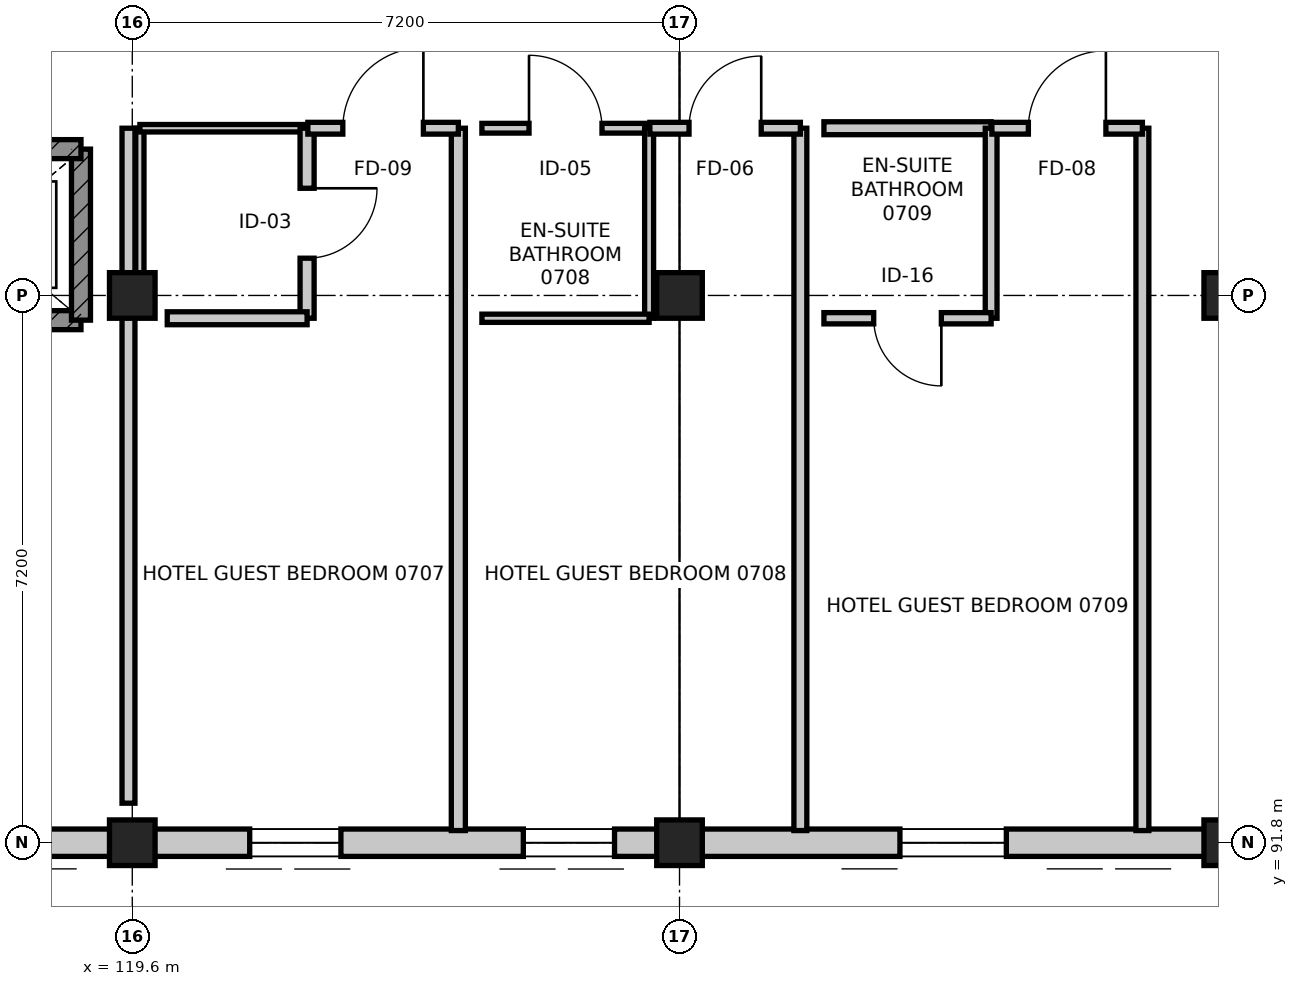
"""IFC4 building model, lengths in metres.
Left out: names, types, materials, properties, quantities, classifications, styles, units other than length and angle.
Written with IfcOpenShell. Run it as: python <this file> out.ifc"""

import sys

from ifc_helpers import new_model, si_unit, direction, frame, frame_2d, origin, origin_2d, place, context, subcontext, project, spatial, rectangle, extrude, element, fill, save


model = new_model("IFC4")
c1 = context("Model", 3, precision=1e-05, world=origin(), true_north=direction((0.0, 1.0)))
c2 = subcontext(c1, "Body", "Model", "MODEL_VIEW")
j1 = project(units=[si_unit("LENGTHUNIT", "METRE"), si_unit("PLANEANGLEUNIT", "RADIAN")], contexts=[c1])
p1 = place(None, origin())
s1 = spatial("IfcSite", under=j1, at=p1, CompositionType="ELEMENT")
p2 = place(p1, origin())
s2 = spatial("IfcBuilding", under=s1, at=p2, CompositionType="ELEMENT")
p3 = place(p2, frame((0.0, 0.0, 30.0)))
s3 = spatial("IfcBuildingStorey", under=s2, at=p3, CompositionType="ELEMENT", Elevation=30.0)
for number, where, z_axis, x_axis in (
    (1, (119.6, 91.8, 0.0), (0.0, 0.0, 1.0), (1.0, 0.0, 0.0)),
    (2, (119.6, 99.0, 0.0), (0.0, 0.0, 1.0), (1.0, 0.0, 0.0)),
    (3, (126.8, 91.8, 0.0), (0.0, 0.0, 1.0), (1.0, 0.0, 0.0)),
    (4, (126.8, 99.0, 0.0), (0.0, 0.0, 1.0), (1.0, 0.0, 0.0)),
    (5, (134.0, 91.8, 0.0), (0.0, 0.0, 1.0), (1.0, 0.0, 0.0)),
    (6, (134.0, 99.0, 0.0), (0.0, 0.0, 1.0), (1.0, 0.0, 0.0)),
):
    element("IfcColumn", number, at=place(p3, frame(where, z_axis=z_axis, x_axis=x_axis)), inside=s3, PredefinedType="COLUMN", context=c2, shape_type="SweptSolid", body=[
        extrude(rectangle(XDim=0.6, YDim=0.6, at=origin_2d()), origin(), (0.0, 0.0, 1.0), 3.6),
    ])
p4 = place(p3, frame((134.0, 91.8, 0.0), z_axis=(0.0, 0.0, 1.0), x_axis=(-1.0, 0.0, 0.0)))
e7 = element("IfcWall", 7, at=p4, inside=s3, PredefinedType="STANDARD", context=c2, shape_type="SweptSolid", body=[
    extrude(rectangle(XDim=7.2, YDim=0.36, at=frame_2d((3.6, 0.0))), origin(), (0.0, 0.0, 1.0), 2.745),
])
p5 = place(p4, frame((2.9, 0.0, 0.75)))
e8 = element("IfcOpeningElement", 8, at=p5, cuts=e7, PredefinedType="OPENING", context=c2, shape_type="SweptSolid", body=[
    extrude(rectangle(XDim=1.4, YDim=1.75, at=frame_2d((0.7, 0.875))), frame((0.0, 0.19, 0.0), z_axis=(0.0, -1.0, 0.0), x_axis=(1.0, 0.0, 0.0)), (0.0, 0.0, 1.0), 0.38),
])
p6 = place(p3, frame((126.8, 91.8, 0.0), z_axis=(0.0, 0.0, 1.0), x_axis=(-1.0, 0.0, 0.0)))
e9 = element("IfcWall", 9, at=p6, inside=s3, PredefinedType="STANDARD", context=c2, shape_type="SweptSolid", body=[
    extrude(rectangle(XDim=7.2, YDim=0.36, at=frame_2d((3.6, 0.0))), origin(), (0.0, 0.0, 1.0), 2.745),
])
p7 = place(p6, frame((0.855, 0.0, 0.75)))
e10 = element("IfcOpeningElement", 10, at=p7, cuts=e9, PredefinedType="OPENING", context=c2, shape_type="SweptSolid", body=[
    extrude(rectangle(XDim=1.2, YDim=1.75, at=frame_2d((0.6, 0.875))), frame((0.0, 0.19, 0.0), z_axis=(0.0, -1.0, 0.0), x_axis=(1.0, 0.0, 0.0)), (0.0, 0.0, 1.0), 0.38),
])
p8 = place(p6, frame((4.455, 0.0, 0.75)))
e11 = element("IfcOpeningElement", 11, at=p8, cuts=e9, PredefinedType="OPENING", context=c2, shape_type="SweptSolid", body=[
    extrude(rectangle(XDim=1.2, YDim=1.75, at=frame_2d((0.6, 0.875))), frame((0.0, 0.19, 0.0), z_axis=(0.0, -1.0, 0.0), x_axis=(1.0, 0.0, 0.0)), (0.0, 0.0, 1.0), 0.38),
])
p9 = place(p3, frame((119.6, 91.8, 0.0), z_axis=(0.0, 0.0, 1.0), x_axis=(-1.0, 0.0, 0.0)))
e12 = element("IfcWall", 12, at=p9, inside=s3, PredefinedType="STANDARD", context=c2, shape_type="SweptSolid", body=[
    extrude(rectangle(XDim=7.2, YDim=0.36, at=frame_2d((3.6, 0.0))), origin(), (0.0, 0.0, 1.0), 2.745),
])
p10 = place(p9, frame((1.488, 0.0, 0.75)))
e13 = element("IfcOpeningElement", 13, at=p10, cuts=e12, PredefinedType="OPENING", context=c2, shape_type="SweptSolid", body=[
    extrude(rectangle(XDim=1.2, YDim=1.75, at=frame_2d((0.6, 0.875))), frame((0.0, 0.19, 0.0), z_axis=(0.0, -1.0, 0.0), x_axis=(1.0, 0.0, 0.0)), (0.0, 0.0, 1.0), 0.38),
])
p11 = place(p9, frame((4.8, 0.0, 0.75)))
e14 = element("IfcOpeningElement", 14, at=p11, cuts=e12, PredefinedType="OPENING", context=c2, shape_type="SweptSolid", body=[
    extrude(rectangle(XDim=1.2, YDim=1.75, at=frame_2d((0.6, 0.875))), frame((0.0, 0.19, 0.0), z_axis=(0.0, -1.0, 0.0), x_axis=(1.0, 0.0, 0.0)), (0.0, 0.0, 1.0), 0.38),
])
p12 = place(p3, frame((116.275, 98.675, 0.0), z_axis=(0.0, 0.0, 1.0), x_axis=(1.0, 0.0, 0.0)))
e15 = element("IfcWall", 15, at=p12, inside=s3, PredefinedType="SHEAR", context=c2, shape_type="SweptSolid", body=[
    extrude(rectangle(XDim=2.65, YDim=0.25, at=frame_2d((1.325, 0.0))), origin(), (0.0, 0.0, 1.0), 3.36),
])
p13 = place(p3, frame((118.925, 98.675, 0.0), z_axis=(0.0, 0.0, 1.0), x_axis=(0.0, 1.0, 0.0)))
e16 = element("IfcWall", 16, at=p13, inside=s3, PredefinedType="SHEAR", context=c2, shape_type="SweptSolid", body=[
    extrude(rectangle(XDim=2.25, YDim=0.25, at=frame_2d((1.125, 0.0))), origin(), (0.0, 0.0, 1.0), 3.36),
])
p14 = place(p3, frame((118.925, 100.925, 0.0), z_axis=(0.0, 0.0, 1.0), x_axis=(-1.0, 0.0, 0.0)))
e17 = element("IfcWall", 17, at=p14, inside=s3, PredefinedType="SHEAR", context=c2, shape_type="SweptSolid", body=[
    extrude(rectangle(XDim=2.65, YDim=0.25, at=frame_2d((1.325, 0.0))), origin(), (0.0, 0.0, 1.0), 3.36),
])
p15 = place(p14, frame((0.775, 0.0, 0.0)))
e18 = element("IfcOpeningElement", 18, at=p15, cuts=e17, PredefinedType="OPENING", context=c2, shape_type="SweptSolid", body=[
    extrude(rectangle(XDim=1.1, YDim=2.15, at=frame_2d((0.55, 1.075))), frame((0.0, 0.135, 0.0), z_axis=(0.0, -1.0, 0.0), x_axis=(1.0, 0.0, 0.0)), (0.0, 0.0, 1.0), 0.27),
])
p16 = place(p3, frame((119.7, 99.06, 0.0), z_axis=(0.0, 0.0, 1.0), x_axis=(0.0, 1.0, 0.0)))
e19 = element("IfcWall", 19, at=p16, inside=s3, PredefinedType="PARTITIONING", context=c2, shape_type="SweptSolid", body=[
    extrude(rectangle(XDim=2.14, YDim=0.108, at=frame_2d((1.07, 0.0))), origin(), (0.0, 0.0, 1.0), 2.695),
])
p17 = place(p3, frame((119.7, 101.2, 0.0), z_axis=(0.0, 0.0, 1.0), x_axis=(1.0, 0.0, 0.0)))
e20 = element("IfcWall", 20, at=p17, inside=s3, PredefinedType="PARTITIONING", context=c2, shape_type="SweptSolid", body=[
    extrude(rectangle(XDim=2.2, YDim=0.098, at=frame_2d((1.1, 0.0))), origin(), (0.0, 0.0, 1.0), 2.695),
])
p18 = place(p3, frame((121.9, 101.2, 0.0), z_axis=(0.0, 0.0, 1.0), x_axis=(0.0, -1.0, 0.0)))
e21 = element("IfcWall", 21, at=p18, inside=s3, PredefinedType="PARTITIONING", context=c2, shape_type="SweptSolid", body=[
    extrude(rectangle(XDim=2.5, YDim=0.185, at=frame_2d((1.25, 0.0))), origin(), (0.0, 0.0, 1.0), 2.745),
])
p19 = place(p18, frame((0.79, 0.0, 0.0)))
e22 = element("IfcOpeningElement", 22, at=p19, cuts=e21, PredefinedType="OPENING", context=c2, shape_type="SweptSolid", body=[
    extrude(rectangle(XDim=0.92, YDim=2.1, at=frame_2d((0.46, 1.05))), frame((0.0, 0.103, 0.0), z_axis=(0.0, -1.0, 0.0), x_axis=(1.0, 0.0, 0.0)), (0.0, 0.0, 1.0), 0.205),
])
p20 = place(p3, frame((121.9, 98.7, 0.0), z_axis=(0.0, 0.0, 1.0), x_axis=(-1.0, 0.0, 0.0)))
e23 = element("IfcWall", 23, at=p20, inside=s3, PredefinedType="PARTITIONING", context=c2, shape_type="SweptSolid", body=[
    extrude(rectangle(XDim=1.84, YDim=0.17, at=frame_2d((0.92, 0.0))), origin(), (0.0, 0.0, 1.0), 2.745),
])
p21 = place(p3, frame((123.89, 101.2, 0.0), z_axis=(0.0, 0.0, 1.0), x_axis=(0.0, -1.0, 0.0)))
e24 = element("IfcWall", 24, at=p21, inside=s3, PredefinedType="PARTITIONING", context=c2, shape_type="SweptSolid", body=[
    extrude(rectangle(XDim=9.24, YDim=0.185, at=frame_2d((4.62, 0.0))), origin(), (0.0, 0.0, 1.0), 2.745),
])
p22 = place(p3, frame((119.55, 92.32, 0.0), z_axis=(0.0, 0.0, 1.0), x_axis=(0.0, 1.0, 0.0)))
e25 = element("IfcWall", 25, at=p22, inside=s3, PredefinedType="PARTITIONING", context=c2, shape_type="SweptSolid", body=[
    extrude(rectangle(XDim=8.88, YDim=0.17, at=frame_2d((4.44, 0.0))), origin(), (0.0, 0.0, 1.0), 2.695),
])
p23 = place(p3, frame((121.91, 101.2, 0.0), z_axis=(0.0, 0.0, 1.0), x_axis=(1.0, 0.0, 0.0)))
e26 = element("IfcWall", 26, at=p23, inside=s3, PredefinedType="PARTITIONING", context=c2, shape_type="SweptSolid", body=[
    extrude(rectangle(XDim=1.98, YDim=0.155, at=frame_2d((0.99, 0.0))), origin(), (0.0, 0.0, 1.0), 3.36),
])
p24 = place(p23, frame((0.46, 0.0, 0.0)))
e27 = element("IfcOpeningElement", 27, at=p24, cuts=e26, PredefinedType="OPENING", context=c2, shape_type="SweptSolid", body=[
    extrude(rectangle(XDim=1.06, YDim=2.2, at=frame_2d((0.53, 1.1))), frame((0.0, 0.087, 0.0), z_axis=(0.0, -1.0, 0.0), x_axis=(1.0, 0.0, 0.0)), (0.0, 0.0, 1.0), 0.175),
])
p25 = place(p3, frame((124.2, 101.2, 0.0), z_axis=(0.0, 0.0, 1.0), x_axis=(1.0, 0.0, 0.0)))
e28 = element("IfcWall", 28, at=p25, inside=s3, PredefinedType="PARTITIONING", context=c2, shape_type="SweptSolid", body=[
    extrude(rectangle(XDim=2.2, YDim=0.128, at=frame_2d((1.1, 0.0))), origin(), (0.0, 0.0, 1.0), 3.36),
])
p26 = place(p25, frame((0.62, 0.0, 0.0)))
e29 = element("IfcOpeningElement", 29, at=p26, cuts=e28, PredefinedType="OPENING", context=c2, shape_type="SweptSolid", body=[
    extrude(rectangle(XDim=0.96, YDim=2.14, at=frame_2d((0.48, 1.07))), frame((0.0, 0.074, 0.0), z_axis=(0.0, -1.0, 0.0), x_axis=(1.0, 0.0, 0.0)), (0.0, 0.0, 1.0), 0.148),
])
p27 = place(p3, frame((126.4, 101.2, 0.0), z_axis=(0.0, 0.0, 1.0), x_axis=(0.0, -1.0, 0.0)))
e30 = element("IfcWall", 30, at=p27, inside=s3, PredefinedType="PARTITIONING", context=c2, shape_type="SweptSolid", body=[
    extrude(rectangle(XDim=2.5, YDim=0.118, at=frame_2d((1.25, 0.0))), origin(), (0.0, 0.0, 1.0), 2.745),
])
p28 = place(p3, frame((126.4, 98.7, 0.0), z_axis=(0.0, 0.0, 1.0), x_axis=(-1.0, 0.0, 0.0)))
e31 = element("IfcWall", 31, at=p28, inside=s3, PredefinedType="PARTITIONING", context=c2, shape_type="SweptSolid", body=[
    extrude(rectangle(XDim=2.2, YDim=0.108, at=frame_2d((1.1, 0.0))), origin(), (0.0, 0.0, 1.0), 3.36),
])
p29 = place(p3, frame((128.39, 101.2, 0.0), z_axis=(0.0, 0.0, 1.0), x_axis=(0.0, -1.0, 0.0)))
e32 = element("IfcWall", 32, at=p29, inside=s3, PredefinedType="PARTITIONING", context=c2, shape_type="SweptSolid", body=[
    extrude(rectangle(XDim=9.24, YDim=0.17, at=frame_2d((4.62, 0.0))), origin(), (0.0, 0.0, 1.0), 2.745),
])
p30 = place(p3, frame((126.41, 101.2, 0.0), z_axis=(0.0, 0.0, 1.0), x_axis=(1.0, 0.0, 0.0)))
e33 = element("IfcWall", 33, at=p30, inside=s3, PredefinedType="PARTITIONING", context=c2, shape_type="SweptSolid", body=[
    extrude(rectangle(XDim=1.98, YDim=0.155, at=frame_2d((0.99, 0.0))), origin(), (0.0, 0.0, 1.0), 2.695),
])
p31 = place(p30, frame((0.515, 0.0, 0.0)))
e34 = element("IfcOpeningElement", 34, at=p31, cuts=e33, PredefinedType="OPENING", context=c2, shape_type="SweptSolid", body=[
    extrude(rectangle(XDim=0.95, YDim=2.1, at=frame_2d((0.475, 1.05))), frame((0.0, 0.087, 0.0), z_axis=(0.0, -1.0, 0.0), x_axis=(1.0, 0.0, 0.0)), (0.0, 0.0, 1.0), 0.175),
])
p32 = place(p3, frame((128.7, 101.2, 0.0), z_axis=(0.0, 0.0, 1.0), x_axis=(1.0, 0.0, 0.0)))
e35 = element("IfcWall", 35, at=p32, inside=s3, PredefinedType="PARTITIONING", context=c2, shape_type="SweptSolid", body=[
    extrude(rectangle(XDim=2.2, YDim=0.17, at=frame_2d((1.1, 0.0))), origin(), (0.0, 0.0, 1.0), 3.36),
])
p33 = place(p3, frame((130.9, 101.2, 0.0), z_axis=(0.0, 0.0, 1.0), x_axis=(0.0, -1.0, 0.0)))
e36 = element("IfcWall", 36, at=p33, inside=s3, PredefinedType="PARTITIONING", context=c2, shape_type="SweptSolid", body=[
    extrude(rectangle(XDim=2.5, YDim=0.155, at=frame_2d((1.25, 0.0))), origin(), (0.0, 0.0, 1.0), 2.745),
])
p34 = place(p3, frame((130.9, 98.7, 0.0), z_axis=(0.0, 0.0, 1.0), x_axis=(-1.0, 0.0, 0.0)))
e37 = element("IfcWall", 37, at=p34, inside=s3, PredefinedType="PARTITIONING", context=c2, shape_type="SweptSolid", body=[
    extrude(rectangle(XDim=2.2, YDim=0.148, at=frame_2d((1.1, 0.0))), origin(), (0.0, 0.0, 1.0), 3.36),
])
p35 = place(p34, frame((0.655, 0.0, 0.0)))
e38 = element("IfcOpeningElement", 38, at=p35, cuts=e37, PredefinedType="OPENING", context=c2, shape_type="SweptSolid", body=[
    extrude(rectangle(XDim=0.89, YDim=2.09, at=frame_2d((0.445, 1.045))), frame((0.0, 0.084, 0.0), z_axis=(0.0, -1.0, 0.0), x_axis=(1.0, 0.0, 0.0)), (0.0, 0.0, 1.0), 0.168),
])
p36 = place(p3, frame((132.89, 101.2, 0.0), z_axis=(0.0, 0.0, 1.0), x_axis=(0.0, -1.0, 0.0)))
e39 = element("IfcWall", 39, at=p36, inside=s3, PredefinedType="PARTITIONING", context=c2, shape_type="SweptSolid", body=[
    extrude(rectangle(XDim=9.24, YDim=0.17, at=frame_2d((4.62, 0.0))), origin(), (0.0, 0.0, 1.0), 2.745),
])
p37 = place(p3, frame((130.91, 101.2, 0.0), z_axis=(0.0, 0.0, 1.0), x_axis=(1.0, 0.0, 0.0)))
e40 = element("IfcWall", 40, at=p37, inside=s3, PredefinedType="PARTITIONING", context=c2, shape_type="SweptSolid", body=[
    extrude(rectangle(XDim=1.98, YDim=0.155, at=frame_2d((0.99, 0.0))), origin(), (0.0, 0.0, 1.0), 3.36),
])
p38 = place(p37, frame((0.48, 0.0, 0.0)))
e41 = element("IfcOpeningElement", 41, at=p38, cuts=e40, PredefinedType="OPENING", context=c2, shape_type="SweptSolid", body=[
    extrude(rectangle(XDim=1.02, YDim=2.15, at=frame_2d((0.51, 1.075))), frame((0.0, 0.087, 0.0), z_axis=(0.0, -1.0, 0.0), x_axis=(1.0, 0.0, 0.0)), (0.0, 0.0, 1.0), 0.175),
])
p39 = place(p5, origin())
e42 = element("IfcWindow", 42, at=p39, inside=s3, PartitioningType="SINGLE_PANEL", PredefinedType="WINDOW", context=c2, shape_type="SweptSolid", body=[
    extrude(rectangle(XDim=1.4, YDim=1.75, at=frame_2d((0.7, 0.875))), frame((0.0, 0.03, 0.0), z_axis=(0.0, -1.0, 0.0), x_axis=(1.0, 0.0, 0.0)), (0.0, 0.0, 1.0), 0.06),
])
fill(e8, e42)
p40 = place(p7, origin())
e43 = element("IfcWindow", 43, at=p40, inside=s3, PartitioningType="SINGLE_PANEL", PredefinedType="WINDOW", context=c2, shape_type="SweptSolid", body=[
    extrude(rectangle(XDim=1.2, YDim=1.75, at=frame_2d((0.6, 0.875))), frame((0.0, 0.03, 0.0), z_axis=(0.0, -1.0, 0.0), x_axis=(1.0, 0.0, 0.0)), (0.0, 0.0, 1.0), 0.06),
])
fill(e10, e43)
p41 = place(p19, origin())
e44 = element("IfcDoor", 44, at=p41, inside=s3, OperationType="SINGLE_SWING_LEFT", PredefinedType="DOOR", context=c2, shape_type="SweptSolid", body=[
    extrude(rectangle(XDim=0.92, YDim=2.1, at=frame_2d((0.46, 1.05))), frame((0.0, 0.025, 0.0), z_axis=(0.0, -1.0, 0.0), x_axis=(1.0, 0.0, 0.0)), (0.0, 0.0, 1.0), 0.05),
])
fill(e22, e44)
p42 = place(p24, origin())
e45 = element("IfcDoor", 45, at=p42, inside=s3, OperationType="SINGLE_SWING_RIGHT", PredefinedType="DOOR", context=c2, shape_type="SweptSolid", body=[
    extrude(rectangle(XDim=1.06, YDim=2.2, at=frame_2d((0.53, 1.1))), frame((0.0, 0.025, 0.0), z_axis=(0.0, -1.0, 0.0), x_axis=(1.0, 0.0, 0.0)), (0.0, 0.0, 1.0), 0.05),
])
fill(e27, e45)
p43 = place(p26, origin())
e46 = element("IfcDoor", 46, at=p43, inside=s3, OperationType="SINGLE_SWING_LEFT", PredefinedType="DOOR", context=c2, shape_type="SweptSolid", body=[
    extrude(rectangle(XDim=0.96, YDim=2.14, at=frame_2d((0.48, 1.07))), frame((0.0, 0.025, 0.0), z_axis=(0.0, -1.0, 0.0), x_axis=(1.0, 0.0, 0.0)), (0.0, 0.0, 1.0), 0.05),
])
fill(e29, e46)
p44 = place(p31, origin())
e47 = element("IfcDoor", 47, at=p44, inside=s3, OperationType="SINGLE_SWING_RIGHT", PredefinedType="DOOR", context=c2, shape_type="SweptSolid", body=[
    extrude(rectangle(XDim=0.95, YDim=2.1, at=frame_2d((0.475, 1.05))), frame((0.0, 0.025, 0.0), z_axis=(0.0, -1.0, 0.0), x_axis=(1.0, 0.0, 0.0)), (0.0, 0.0, 1.0), 0.05),
])
fill(e34, e47)
p45 = place(p35, origin())
e48 = element("IfcDoor", 48, at=p45, inside=s3, OperationType="SINGLE_SWING_LEFT", PredefinedType="DOOR", context=c2, shape_type="SweptSolid", body=[
    extrude(rectangle(XDim=0.89, YDim=2.09, at=frame_2d((0.445, 1.045))), frame((0.0, 0.025, 0.0), z_axis=(0.0, -1.0, 0.0), x_axis=(1.0, 0.0, 0.0)), (0.0, 0.0, 1.0), 0.05),
])
fill(e38, e48)
p46 = place(p38, origin())
e49 = element("IfcDoor", 49, at=p46, inside=s3, OperationType="SINGLE_SWING_RIGHT", PredefinedType="DOOR", context=c2, shape_type="SweptSolid", body=[
    extrude(rectangle(XDim=1.02, YDim=2.15, at=frame_2d((0.51, 1.075))), frame((0.0, 0.025, 0.0), z_axis=(0.0, -1.0, 0.0), x_axis=(1.0, 0.0, 0.0)), (0.0, 0.0, 1.0), 0.05),
])
fill(e41, e49)
p47 = place(p8, origin())
e50 = element("IfcWindow", 50, at=p47, inside=s3, PartitioningType="SINGLE_PANEL", PredefinedType="WINDOW", context=c2, shape_type="SweptSolid", body=[
    extrude(rectangle(XDim=1.2, YDim=1.75, at=frame_2d((0.6, 0.875))), frame((0.0, 0.03, 0.0), z_axis=(0.0, -1.0, 0.0), x_axis=(1.0, 0.0, 0.0)), (0.0, 0.0, 1.0), 0.06),
])
fill(e11, e50)
save(model, sys.argv[1])
